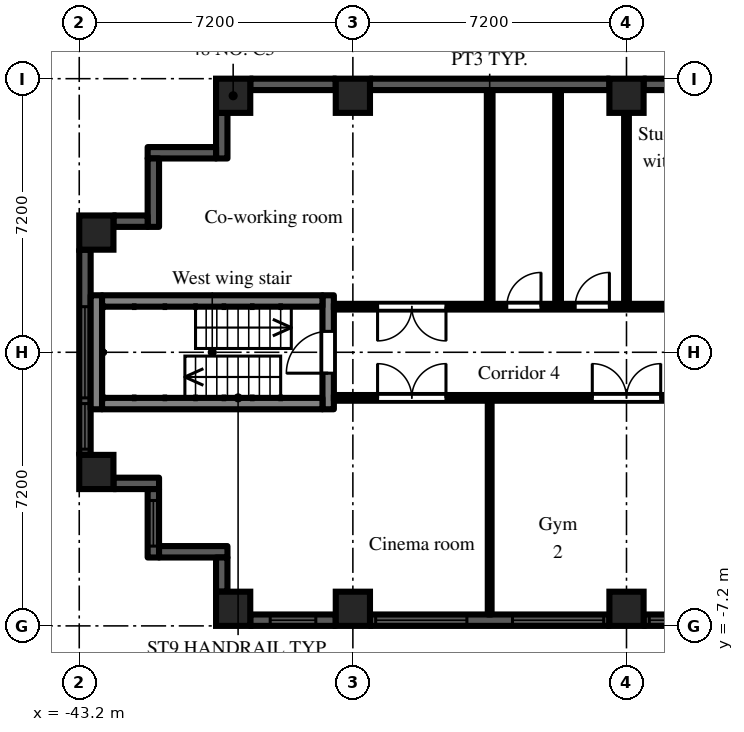
"""IFC4 building model, lengths in metres.
Left out: names, types, materials, properties, quantities, classifications, styles, units other than length and angle.
Written with IfcOpenShell. Run it as: python <this file> out.ifc"""

import sys

from ifc_helpers import new_model, si_unit, direction, frame, frame_2d, origin, origin_2d, place, context, subcontext, project, spatial, rectangle, extrude, element, fill, save


model = new_model("IFC4")
c1 = context("Model", 3, precision=1e-05, world=origin(), true_north=direction((0.0, 1.0)))
c2 = subcontext(c1, "Body", "Model", "MODEL_VIEW")
j1 = project(units=[si_unit("LENGTHUNIT", "METRE"), si_unit("PLANEANGLEUNIT", "RADIAN")], contexts=[c1])
p1 = place(None, origin())
s1 = spatial("IfcSite", under=j1, at=p1, CompositionType="ELEMENT")
p2 = place(p1, origin())
s2 = spatial("IfcBuilding", under=s1, at=p2, CompositionType="ELEMENT")
p3 = place(p2, frame((0.0, 0.0, 84.9)))
s3 = spatial("IfcBuildingStorey", under=s2, at=p3, CompositionType="ELEMENT", Elevation=84.9)
for number, where, z_axis, x_axis in (
    (1, (-42.75, -3.15, 0.0), (0.0, 0.0, 1.0), (1.0, 0.0, 0.0)),
    (2, (-42.75, 3.15, 0.0), (0.0, 0.0, 1.0), (1.0, 0.0, 0.0)),
    (3, (-39.15, -6.75, 0.0), (0.0, 0.0, 1.0), (1.0, 0.0, 0.0)),
    (4, (-39.15, 6.75, 0.0), (0.0, 0.0, 1.0), (1.0, 0.0, 0.0)),
    (5, (-36.0, -6.75, 0.0), (0.0, 0.0, 1.0), (1.0, 0.0, 0.0)),
    (6, (-36.0, 6.75, 0.0), (0.0, 0.0, 1.0), (1.0, 0.0, 0.0)),
    (7, (-28.8, -6.75, 0.0), (0.0, 0.0, 1.0), (1.0, 0.0, 0.0)),
    (8, (-28.8, 6.75, 0.0), (0.0, 0.0, 1.0), (1.0, 0.0, 0.0)),
):
    element("IfcColumn", number, at=place(p3, frame(where, z_axis=z_axis, x_axis=x_axis)), inside=s3, PredefinedType="COLUMN", context=c2, shape_type="SweptSolid", body=[
        extrude(rectangle(XDim=0.9, YDim=0.9, at=origin_2d()), origin(), (0.0, 0.0, 1.0), 3.0),
    ])
p4 = place(p3, frame((-25.2, 7.05, 0.0), z_axis=(0.0, 0.0, 1.0), x_axis=(-1.0, 0.0, 0.0)))
e9 = element("IfcWall", 9, at=p4, inside=s3, PredefinedType="SOLIDWALL", context=c2, shape_type="SweptSolid", body=[
    extrude(rectangle(XDim=3.15, YDim=0.3, at=frame_2d((1.575, 0.0))), origin(), (0.0, 0.0, 1.0), 2.1),
])
p5 = place(p4, frame((0.975, 0.0, 0.2)))
e10 = element("IfcOpeningElement", 10, at=p5, cuts=e9, PredefinedType="OPENING", context=c2, shape_type="SweptSolid", body=[
    extrude(rectangle(XDim=1.2, YDim=1.85, at=frame_2d((0.6, 0.925))), frame((0.0, 0.16, 0.0), z_axis=(0.0, -1.0, 0.0), x_axis=(1.0, 0.0, 0.0)), (0.0, 0.0, 1.0), 0.32),
])
p6 = place(p3, frame((-29.25, 7.05, 0.0), z_axis=(0.0, 0.0, 1.0), x_axis=(-1.0, 0.0, 0.0)))
e11 = element("IfcWall", 11, at=p6, inside=s3, PredefinedType="SOLIDWALL", context=c2, shape_type="SweptSolid", body=[
    extrude(rectangle(XDim=6.3, YDim=0.3, at=frame_2d((3.15, 0.0))), origin(), (0.0, 0.0, 1.0), 2.1),
])
p7 = place(p3, frame((-36.45, 7.05, 0.0), z_axis=(0.0, 0.0, 1.0), x_axis=(-1.0, 0.0, 0.0)))
e12 = element("IfcWall", 12, at=p7, inside=s3, PredefinedType="SOLIDWALL", context=c2, shape_type="SweptSolid", body=[
    extrude(rectangle(XDim=2.25, YDim=0.3, at=frame_2d((1.125, 0.0))), origin(), (0.0, 0.0, 1.0), 2.1),
])
p8 = place(p3, frame((-39.45, 6.3, 0.0), z_axis=(0.0, 0.0, 1.0), x_axis=(0.0, -1.0, 0.0)))
e13 = element("IfcWall", 13, at=p8, inside=s3, PredefinedType="SOLIDWALL", context=c2, shape_type="SweptSolid", body=[
    extrude(rectangle(XDim=1.2, YDim=0.3, at=frame_2d((0.6, 0.0))), origin(), (0.0, 0.0, 1.0), 2.575),
])
p9 = place(p3, frame((-39.6, 5.25, 0.0), z_axis=(0.0, 0.0, 1.0), x_axis=(-1.0, 0.0, 0.0)))
e14 = element("IfcWall", 14, at=p9, inside=s3, PredefinedType="SOLIDWALL", context=c2, shape_type="SweptSolid", body=[
    extrude(rectangle(XDim=1.8, YDim=0.3, at=frame_2d((0.9, 0.0))), origin(), (0.0, 0.0, 1.0), 2.575),
])
p10 = place(p3, frame((-41.25, 5.1, 0.0), z_axis=(0.0, 0.0, 1.0), x_axis=(0.0, -1.0, 0.0)))
e15 = element("IfcWall", 15, at=p10, inside=s3, PredefinedType="SOLIDWALL", context=c2, shape_type="SweptSolid", body=[
    extrude(rectangle(XDim=1.8, YDim=0.3, at=frame_2d((0.9, 0.0))), origin(), (0.0, 0.0, 1.0), 2.575),
])
p11 = place(p3, frame((-41.4, 3.45, 0.0), z_axis=(0.0, 0.0, 1.0), x_axis=(-1.0, 0.0, 0.0)))
e16 = element("IfcWall", 16, at=p11, inside=s3, PredefinedType="SOLIDWALL", context=c2, shape_type="SweptSolid", body=[
    extrude(rectangle(XDim=0.9, YDim=0.3, at=frame_2d((0.45, 0.0))), origin(), (0.0, 0.0, 1.0), 2.575),
])
p12 = place(p3, frame((-43.05, 2.7, 0.0), z_axis=(0.0, 0.0, 1.0), x_axis=(0.0, -1.0, 0.0)))
e17 = element("IfcWall", 17, at=p12, inside=s3, PredefinedType="SOLIDWALL", context=c2, shape_type="SweptSolid", body=[
    extrude(rectangle(XDim=5.4, YDim=0.3, at=frame_2d((2.7, 0.0))), origin(), (0.0, 0.0, 1.0), 2.1),
])
p13 = place(p12, frame((1.5, 0.0, 0.2)))
e18 = element("IfcOpeningElement", 18, at=p13, cuts=e17, PredefinedType="OPENING", context=c2, shape_type="SweptSolid", body=[
    extrude(rectangle(XDim=2.4, YDim=1.85, at=frame_2d((1.2, 0.925))), frame((0.0, 0.16, 0.0), z_axis=(0.0, -1.0, 0.0), x_axis=(1.0, 0.0, 0.0)), (0.0, 0.0, 1.0), 0.32),
])
p14 = place(p12, frame((4.05, 0.0, 0.2)))
e19 = element("IfcOpeningElement", 19, at=p14, cuts=e17, PredefinedType="OPENING", context=c2, shape_type="SweptSolid", body=[
    extrude(rectangle(XDim=1.2, YDim=1.85, at=frame_2d((0.6, 0.925))), frame((0.0, 0.16, 0.0), z_axis=(0.0, -1.0, 0.0), x_axis=(1.0, 0.0, 0.0)), (0.0, 0.0, 1.0), 0.32),
])
p15 = place(p3, frame((-42.3, -3.45, 0.0), z_axis=(0.0, 0.0, 1.0), x_axis=(1.0, 0.0, 0.0)))
e20 = element("IfcWall", 20, at=p15, inside=s3, PredefinedType="SOLIDWALL", context=c2, shape_type="SweptSolid", body=[
    extrude(rectangle(XDim=1.2, YDim=0.3, at=frame_2d((0.6, 0.0))), origin(), (0.0, 0.0, 1.0), 2.575),
])
p16 = place(p3, frame((-41.25, -3.6, 0.0), z_axis=(0.0, 0.0, 1.0), x_axis=(0.0, -1.0, 0.0)))
e21 = element("IfcWall", 21, at=p16, inside=s3, PredefinedType="SOLIDWALL", context=c2, shape_type="SweptSolid", body=[
    extrude(rectangle(XDim=1.8, YDim=0.3, at=frame_2d((0.9, 0.0))), origin(), (0.0, 0.0, 1.0), 2.575),
])
p17 = place(p16, frame((0.3, 0.0, 0.2)))
e22 = element("IfcOpeningElement", 22, at=p17, cuts=e21, PredefinedType="OPENING", context=c2, shape_type="SweptSolid", body=[
    extrude(rectangle(XDim=1.2, YDim=1.85, at=frame_2d((0.6, 0.925))), frame((0.0, 0.16, 0.0), z_axis=(0.0, -1.0, 0.0), x_axis=(1.0, 0.0, 0.0)), (0.0, 0.0, 1.0), 0.32),
])
p18 = place(p3, frame((-41.1, -5.25, 0.0), z_axis=(0.0, 0.0, 1.0), x_axis=(1.0, 0.0, 0.0)))
e23 = element("IfcWall", 23, at=p18, inside=s3, PredefinedType="SOLIDWALL", context=c2, shape_type="SweptSolid", body=[
    extrude(rectangle(XDim=1.8, YDim=0.3, at=frame_2d((0.9, 0.0))), origin(), (0.0, 0.0, 1.0), 2.575),
])
p19 = place(p3, frame((-39.45, -5.4, 0.0), z_axis=(0.0, 0.0, 1.0), x_axis=(0.0, -1.0, 0.0)))
e24 = element("IfcWall", 24, at=p19, inside=s3, PredefinedType="SOLIDWALL", context=c2, shape_type="SweptSolid", body=[
    extrude(rectangle(XDim=0.9, YDim=0.3, at=frame_2d((0.45, 0.0))), origin(), (0.0, 0.0, 1.0), 2.575),
])
p20 = place(p3, frame((-38.7, -7.05, 0.0), z_axis=(0.0, 0.0, 1.0), x_axis=(1.0, 0.0, 0.0)))
e25 = element("IfcWall", 25, at=p20, inside=s3, PredefinedType="SOLIDWALL", context=c2, shape_type="SweptSolid", body=[
    extrude(rectangle(XDim=2.25, YDim=0.3, at=frame_2d((1.125, 0.0))), origin(), (0.0, 0.0, 1.0), 2.1),
])
p21 = place(p20, frame((0.525, 0.0, 0.2)))
e26 = element("IfcOpeningElement", 26, at=p21, cuts=e25, PredefinedType="OPENING", context=c2, shape_type="SweptSolid", body=[
    extrude(rectangle(XDim=1.2, YDim=1.85, at=frame_2d((0.6, 0.925))), frame((0.0, 0.16, 0.0), z_axis=(0.0, -1.0, 0.0), x_axis=(1.0, 0.0, 0.0)), (0.0, 0.0, 1.0), 0.32),
])
p22 = place(p3, frame((-35.55, -7.05, 0.0), z_axis=(0.0, 0.0, 1.0), x_axis=(1.0, 0.0, 0.0)))
e27 = element("IfcWall", 27, at=p22, inside=s3, PredefinedType="SOLIDWALL", context=c2, shape_type="SweptSolid", body=[
    extrude(rectangle(XDim=6.3, YDim=0.3, at=frame_2d((3.15, 0.0))), origin(), (0.0, 0.0, 1.0), 2.1),
])
p23 = place(p22, frame((0.15, 0.0, 0.2)))
e28 = element("IfcOpeningElement", 28, at=p23, cuts=e27, PredefinedType="OPENING", context=c2, shape_type="SweptSolid", body=[
    extrude(rectangle(XDim=2.4, YDim=1.85, at=frame_2d((1.2, 0.925))), frame((0.0, 0.16, 0.0), z_axis=(0.0, -1.0, 0.0), x_axis=(1.0, 0.0, 0.0)), (0.0, 0.0, 1.0), 0.32),
])
p24 = place(p22, frame((3.75, 0.0, 0.2)))
e29 = element("IfcOpeningElement", 29, at=p24, cuts=e27, PredefinedType="OPENING", context=c2, shape_type="SweptSolid", body=[
    extrude(rectangle(XDim=2.4, YDim=1.85, at=frame_2d((1.2, 0.925))), frame((0.0, 0.16, 0.0), z_axis=(0.0, -1.0, 0.0), x_axis=(1.0, 0.0, 0.0)), (0.0, 0.0, 1.0), 0.32),
])
p25 = place(p3, frame((-28.35, -7.05, 0.0), z_axis=(0.0, 0.0, 1.0), x_axis=(1.0, 0.0, 0.0)))
e30 = element("IfcWall", 30, at=p25, inside=s3, PredefinedType="SOLIDWALL", context=c2, shape_type="SweptSolid", body=[
    extrude(rectangle(XDim=3.15, YDim=0.3, at=frame_2d((1.575, 0.0))), origin(), (0.0, 0.0, 1.0), 2.1),
])
p26 = place(p25, frame((0.15, 0.0, 0.2)))
e31 = element("IfcOpeningElement", 31, at=p26, cuts=e30, PredefinedType="OPENING", context=c2, shape_type="SweptSolid", body=[
    extrude(rectangle(XDim=2.4, YDim=1.85, at=frame_2d((1.2, 0.925))), frame((0.0, 0.16, 0.0), z_axis=(0.0, -1.0, 0.0), x_axis=(1.0, 0.0, 0.0)), (0.0, 0.0, 1.0), 0.32),
])
p27 = place(p3, frame((-36.65, -1.5, 0.0), z_axis=(0.0, 0.0, 1.0), x_axis=(0.0, 1.0, 0.0)))
e32 = element("IfcWall", 32, at=p27, inside=s3, PredefinedType="SHEAR", context=c2, shape_type="SweptSolid", body=[
    extrude(rectangle(XDim=3.0, YDim=0.3, at=frame_2d((1.5, 0.0))), origin(), (0.0, 0.0, 1.0), 2.575),
])
p28 = place(p27, frame((0.95, 0.0, 0.0)))
e33 = element("IfcOpeningElement", 33, at=p28, cuts=e32, PredefinedType="OPENING", context=c2, shape_type="SweptSolid", body=[
    extrude(rectangle(XDim=1.1, YDim=2.1, at=frame_2d((0.55, 1.05))), frame((0.0, 0.16, 0.0), z_axis=(0.0, -1.0, 0.0), x_axis=(1.0, 0.0, 0.0)), (0.0, 0.0, 1.0), 0.32),
])
p29 = place(p3, frame((-42.75, -1.5, 0.0), z_axis=(0.0, 0.0, 1.0), x_axis=(0.0, 1.0, 0.0)))
e34 = element("IfcWall", 34, at=p29, inside=s3, PredefinedType="SHEAR", context=c2, shape_type="SweptSolid", body=[
    extrude(rectangle(XDim=3.0, YDim=0.3, at=frame_2d((1.5, 0.0))), origin(), (0.0, 0.0, 1.0), 2.575),
])
for number, where, z_axis, x_axis in (
    (35, (-36.8, -1.35, 0.0), (0.0, 0.0, 1.0), (-1.0, 0.0, 0.0)),
    (36, (-36.8, 1.35, 0.0), (0.0, 0.0, 1.0), (-1.0, 0.0, 0.0)),
):
    element("IfcWall", number, at=place(p3, frame(where, z_axis=z_axis, x_axis=x_axis)), inside=s3, PredefinedType="SHEAR", context=c2, shape_type="SweptSolid", body=[
        extrude(rectangle(XDim=5.8, YDim=0.3, at=frame_2d((2.9, 0.0))), origin(), (0.0, 0.0, 1.0), 2.575),
    ])
p30 = place(p3, frame((-36.5, -1.2, 0.0), z_axis=(0.0, 0.0, 1.0), x_axis=(1.0, 0.0, 0.0)))
e37 = element("IfcWall", 37, at=p30, inside=s3, PredefinedType="PARTITIONING", context=c2, shape_type="SweptSolid", body=[
    extrude(rectangle(XDim=14.9, YDim=0.15, at=frame_2d((7.45, 0.0))), origin(), (0.0, 0.0, 1.0), 2.575),
])
p31 = place(p30, frame((13.3, 0.0, 0.0)))
e38 = element("IfcOpeningElement", 38, at=p31, cuts=e37, PredefinedType="OPENING", context=c2, shape_type="SweptSolid", body=[
    extrude(rectangle(XDim=1.0, YDim=2.1, at=frame_2d((0.5, 1.05))), frame((0.0, 0.085, 0.0), z_axis=(0.0, -1.0, 0.0), x_axis=(1.0, 0.0, 0.0)), (0.0, 0.0, 1.0), 0.17),
])
p32 = place(p30, frame((6.8, 0.0, 0.0)))
e39 = element("IfcOpeningElement", 39, at=p32, cuts=e37, PredefinedType="OPENING", context=c2, shape_type="SweptSolid", body=[
    extrude(rectangle(XDim=1.8, YDim=2.1, at=frame_2d((0.9, 1.05))), frame((0.0, 0.085, 0.0), z_axis=(0.0, -1.0, 0.0), x_axis=(1.0, 0.0, 0.0)), (0.0, 0.0, 1.0), 0.17),
])
p33 = place(p30, frame((1.15, 0.0, 0.0)))
e40 = element("IfcOpeningElement", 40, at=p33, cuts=e37, PredefinedType="OPENING", context=c2, shape_type="SweptSolid", body=[
    extrude(rectangle(XDim=1.8, YDim=2.1, at=frame_2d((0.9, 1.05))), frame((0.0, 0.085, 0.0), z_axis=(0.0, -1.0, 0.0), x_axis=(1.0, 0.0, 0.0)), (0.0, 0.0, 1.0), 0.17),
])
p34 = place(p3, frame((-36.5, 1.2, 0.0), z_axis=(0.0, 0.0, 1.0), x_axis=(1.0, 0.0, 0.0)))
e41 = element("IfcWall", 41, at=p34, inside=s3, PredefinedType="PARTITIONING", context=c2, shape_type="SweptSolid", body=[
    extrude(rectangle(XDim=14.9, YDim=0.15, at=frame_2d((7.45, 0.0))), origin(), (0.0, 0.0, 1.0), 2.575),
])
p35 = place(p34, frame((10.1, 0.0, 0.0)))
e42 = element("IfcOpeningElement", 42, at=p35, cuts=e41, PredefinedType="OPENING", context=c2, shape_type="SweptSolid", body=[
    extrude(rectangle(XDim=1.0, YDim=2.1, at=frame_2d((0.5, 1.05))), frame((0.0, 0.085, 0.0), z_axis=(0.0, -1.0, 0.0), x_axis=(1.0, 0.0, 0.0)), (0.0, 0.0, 1.0), 0.17),
])
p36 = place(p34, frame((6.35, 0.0, 0.0)))
e43 = element("IfcOpeningElement", 43, at=p36, cuts=e41, PredefinedType="OPENING", context=c2, shape_type="SweptSolid", body=[
    extrude(rectangle(XDim=0.9, YDim=2.1, at=frame_2d((0.45, 1.05))), frame((0.0, 0.085, 0.0), z_axis=(0.0, -1.0, 0.0), x_axis=(1.0, 0.0, 0.0)), (0.0, 0.0, 1.0), 0.17),
])
p37 = place(p34, frame((4.55, 0.0, 0.0)))
e44 = element("IfcOpeningElement", 44, at=p37, cuts=e41, PredefinedType="OPENING", context=c2, shape_type="SweptSolid", body=[
    extrude(rectangle(XDim=0.9, YDim=2.1, at=frame_2d((0.45, 1.05))), frame((0.0, 0.085, 0.0), z_axis=(0.0, -1.0, 0.0), x_axis=(1.0, 0.0, 0.0)), (0.0, 0.0, 1.0), 0.17),
])
p38 = place(p34, frame((1.15, 0.0, 0.0)))
e45 = element("IfcOpeningElement", 45, at=p38, cuts=e41, PredefinedType="OPENING", context=c2, shape_type="SweptSolid", body=[
    extrude(rectangle(XDim=1.8, YDim=2.1, at=frame_2d((0.9, 1.05))), frame((0.0, 0.085, 0.0), z_axis=(0.0, -1.0, 0.0), x_axis=(1.0, 0.0, 0.0)), (0.0, 0.0, 1.0), 0.17),
])
p39 = place(p3, frame((-32.4, -6.9, 0.0), z_axis=(0.0, 0.0, 1.0), x_axis=(0.0, 1.0, 0.0)))
e46 = element("IfcWall", 46, at=p39, inside=s3, PredefinedType="PARTITIONING", context=c2, shape_type="SweptSolid", body=[
    extrude(rectangle(XDim=5.625, YDim=0.1, at=frame_2d((2.812, 0.0))), origin(), (0.0, 0.0, 1.0), 2.575),
])
for number, where, z_axis, x_axis in (
    (47, (-32.4, 1.275, 0.0), (0.0, 0.0, 1.0), (0.0, 1.0, 0.0)),
    (48, (-30.6, 1.275, 0.0), (0.0, 0.0, 1.0), (0.0, 1.0, 0.0)),
):
    element("IfcWall", number, at=place(p3, frame(where, z_axis=z_axis, x_axis=x_axis)), inside=s3, PredefinedType="PARTITIONING", context=c2, shape_type="SweptSolid", body=[
        extrude(rectangle(XDim=5.625, YDim=0.15, at=frame_2d((2.812, 0.0))), origin(), (0.0, 0.0, 1.0), 2.575),
    ])
p40 = place(p3, frame((-28.8, 1.275, 0.0), z_axis=(0.0, 0.0, 1.0), x_axis=(0.0, 1.0, 0.0)))
e49 = element("IfcWall", 49, at=p40, inside=s3, PredefinedType="PARTITIONING", context=c2, shape_type="SweptSolid", body=[
    extrude(rectangle(XDim=5.625, YDim=0.125, at=frame_2d((2.812, 0.0))), origin(), (0.0, 0.0, 1.0), 2.575),
])
p41 = place(p13, origin())
e50 = element("IfcWindow", 50, at=p41, inside=s3, PartitioningType="SINGLE_PANEL", PredefinedType="WINDOW", context=c2, shape_type="SweptSolid", body=[
    extrude(rectangle(XDim=2.4, YDim=1.85, at=frame_2d((1.2, 0.925))), frame((0.0, 0.03, 0.0), z_axis=(0.0, -1.0, 0.0), x_axis=(1.0, 0.0, 0.0)), (0.0, 0.0, 1.0), 0.06),
])
fill(e18, e50)
p42 = place(p14, origin())
e51 = element("IfcWindow", 51, at=p42, inside=s3, PartitioningType="SINGLE_PANEL", PredefinedType="WINDOW", context=c2, shape_type="SweptSolid", body=[
    extrude(rectangle(XDim=1.2, YDim=1.85, at=frame_2d((0.6, 0.925))), frame((0.0, 0.03, 0.0), z_axis=(0.0, -1.0, 0.0), x_axis=(1.0, 0.0, 0.0)), (0.0, 0.0, 1.0), 0.06),
])
fill(e19, e51)
p43 = place(p17, origin())
e52 = element("IfcWindow", 52, at=p43, inside=s3, PartitioningType="SINGLE_PANEL", PredefinedType="WINDOW", context=c2, shape_type="SweptSolid", body=[
    extrude(rectangle(XDim=1.2, YDim=1.85, at=frame_2d((0.6, 0.925))), frame((0.0, 0.03, 0.0), z_axis=(0.0, -1.0, 0.0), x_axis=(1.0, 0.0, 0.0)), (0.0, 0.0, 1.0), 0.06),
])
fill(e22, e52)
p44 = place(p21, origin())
e53 = element("IfcWindow", 53, at=p44, inside=s3, PartitioningType="SINGLE_PANEL", PredefinedType="WINDOW", context=c2, shape_type="SweptSolid", body=[
    extrude(rectangle(XDim=1.2, YDim=1.85, at=frame_2d((0.6, 0.925))), frame((0.0, 0.03, 0.0), z_axis=(0.0, -1.0, 0.0), x_axis=(1.0, 0.0, 0.0)), (0.0, 0.0, 1.0), 0.06),
])
fill(e26, e53)
p45 = place(p23, origin())
e54 = element("IfcWindow", 54, at=p45, inside=s3, PartitioningType="SINGLE_PANEL", PredefinedType="WINDOW", context=c2, shape_type="SweptSolid", body=[
    extrude(rectangle(XDim=2.4, YDim=1.85, at=frame_2d((1.2, 0.925))), frame((0.0, 0.03, 0.0), z_axis=(0.0, -1.0, 0.0), x_axis=(1.0, 0.0, 0.0)), (0.0, 0.0, 1.0), 0.06),
])
fill(e28, e54)
p46 = place(p24, origin())
e55 = element("IfcWindow", 55, at=p46, inside=s3, PartitioningType="SINGLE_PANEL", PredefinedType="WINDOW", context=c2, shape_type="SweptSolid", body=[
    extrude(rectangle(XDim=2.4, YDim=1.85, at=frame_2d((1.2, 0.925))), frame((0.0, 0.03, 0.0), z_axis=(0.0, -1.0, 0.0), x_axis=(1.0, 0.0, 0.0)), (0.0, 0.0, 1.0), 0.06),
])
fill(e29, e55)
p47 = place(p26, origin())
e56 = element("IfcWindow", 56, at=p47, inside=s3, PartitioningType="SINGLE_PANEL", PredefinedType="WINDOW", context=c2, shape_type="SweptSolid", body=[
    extrude(rectangle(XDim=2.4, YDim=1.85, at=frame_2d((1.2, 0.925))), frame((0.0, 0.03, 0.0), z_axis=(0.0, -1.0, 0.0), x_axis=(1.0, 0.0, 0.0)), (0.0, 0.0, 1.0), 0.06),
])
fill(e31, e56)
p48 = place(p28, origin())
e57 = element("IfcDoor", 57, at=p48, inside=s3, OperationType="SINGLE_SWING_LEFT", PredefinedType="DOOR", context=c2, shape_type="SweptSolid", body=[
    extrude(rectangle(XDim=1.1, YDim=2.1, at=frame_2d((0.55, 1.05))), frame((0.0, 0.025, 0.0), z_axis=(0.0, -1.0, 0.0), x_axis=(1.0, 0.0, 0.0)), (0.0, 0.0, 1.0), 0.05),
])
fill(e33, e57)
p49 = place(p32, origin())
e58 = element("IfcDoor", 58, at=p49, inside=s3, OperationType="DOUBLE_DOOR_DOUBLE_SWING", PredefinedType="DOOR", context=c2, shape_type="SweptSolid", body=[
    extrude(rectangle(XDim=1.8, YDim=2.1, at=frame_2d((0.9, 1.05))), frame((0.0, 0.025, 0.0), z_axis=(0.0, -1.0, 0.0), x_axis=(1.0, 0.0, 0.0)), (0.0, 0.0, 1.0), 0.05),
])
fill(e39, e58)
p50 = place(p33, origin())
e59 = element("IfcDoor", 59, at=p50, inside=s3, OperationType="DOUBLE_DOOR_DOUBLE_SWING", PredefinedType="DOOR", context=c2, shape_type="SweptSolid", body=[
    extrude(rectangle(XDim=1.8, YDim=2.1, at=frame_2d((0.9, 1.05))), frame((0.0, 0.025, 0.0), z_axis=(0.0, -1.0, 0.0), x_axis=(1.0, 0.0, 0.0)), (0.0, 0.0, 1.0), 0.05),
])
fill(e40, e59)
p51 = place(p36, origin())
e60 = element("IfcDoor", 60, at=p51, inside=s3, OperationType="SINGLE_SWING_RIGHT", PredefinedType="DOOR", context=c2, shape_type="SweptSolid", body=[
    extrude(rectangle(XDim=0.9, YDim=2.1, at=frame_2d((0.45, 1.05))), frame((0.0, 0.025, 0.0), z_axis=(0.0, -1.0, 0.0), x_axis=(1.0, 0.0, 0.0)), (0.0, 0.0, 1.0), 0.05),
])
fill(e43, e60)
p52 = place(p37, origin())
e61 = element("IfcDoor", 61, at=p52, inside=s3, OperationType="SINGLE_SWING_RIGHT", PredefinedType="DOOR", context=c2, shape_type="SweptSolid", body=[
    extrude(rectangle(XDim=0.9, YDim=2.1, at=frame_2d((0.45, 1.05))), frame((0.0, 0.025, 0.0), z_axis=(0.0, -1.0, 0.0), x_axis=(1.0, 0.0, 0.0)), (0.0, 0.0, 1.0), 0.05),
])
fill(e44, e61)
p53 = place(p38, frame((1.8, 0.0, 0.0), z_axis=(0.0, 0.0, 1.0), x_axis=(-1.0, 0.0, 0.0)))
e62 = element("IfcDoor", 62, at=p53, inside=s3, OperationType="DOUBLE_DOOR_DOUBLE_SWING", PredefinedType="DOOR", context=c2, shape_type="SweptSolid", body=[
    extrude(rectangle(XDim=1.8, YDim=2.1, at=frame_2d((0.9, 1.05))), frame((0.0, 0.025, 0.0), z_axis=(0.0, -1.0, 0.0), x_axis=(1.0, 0.0, 0.0)), (0.0, 0.0, 1.0), 0.05),
])
fill(e45, e62)
save(model, sys.argv[1])
